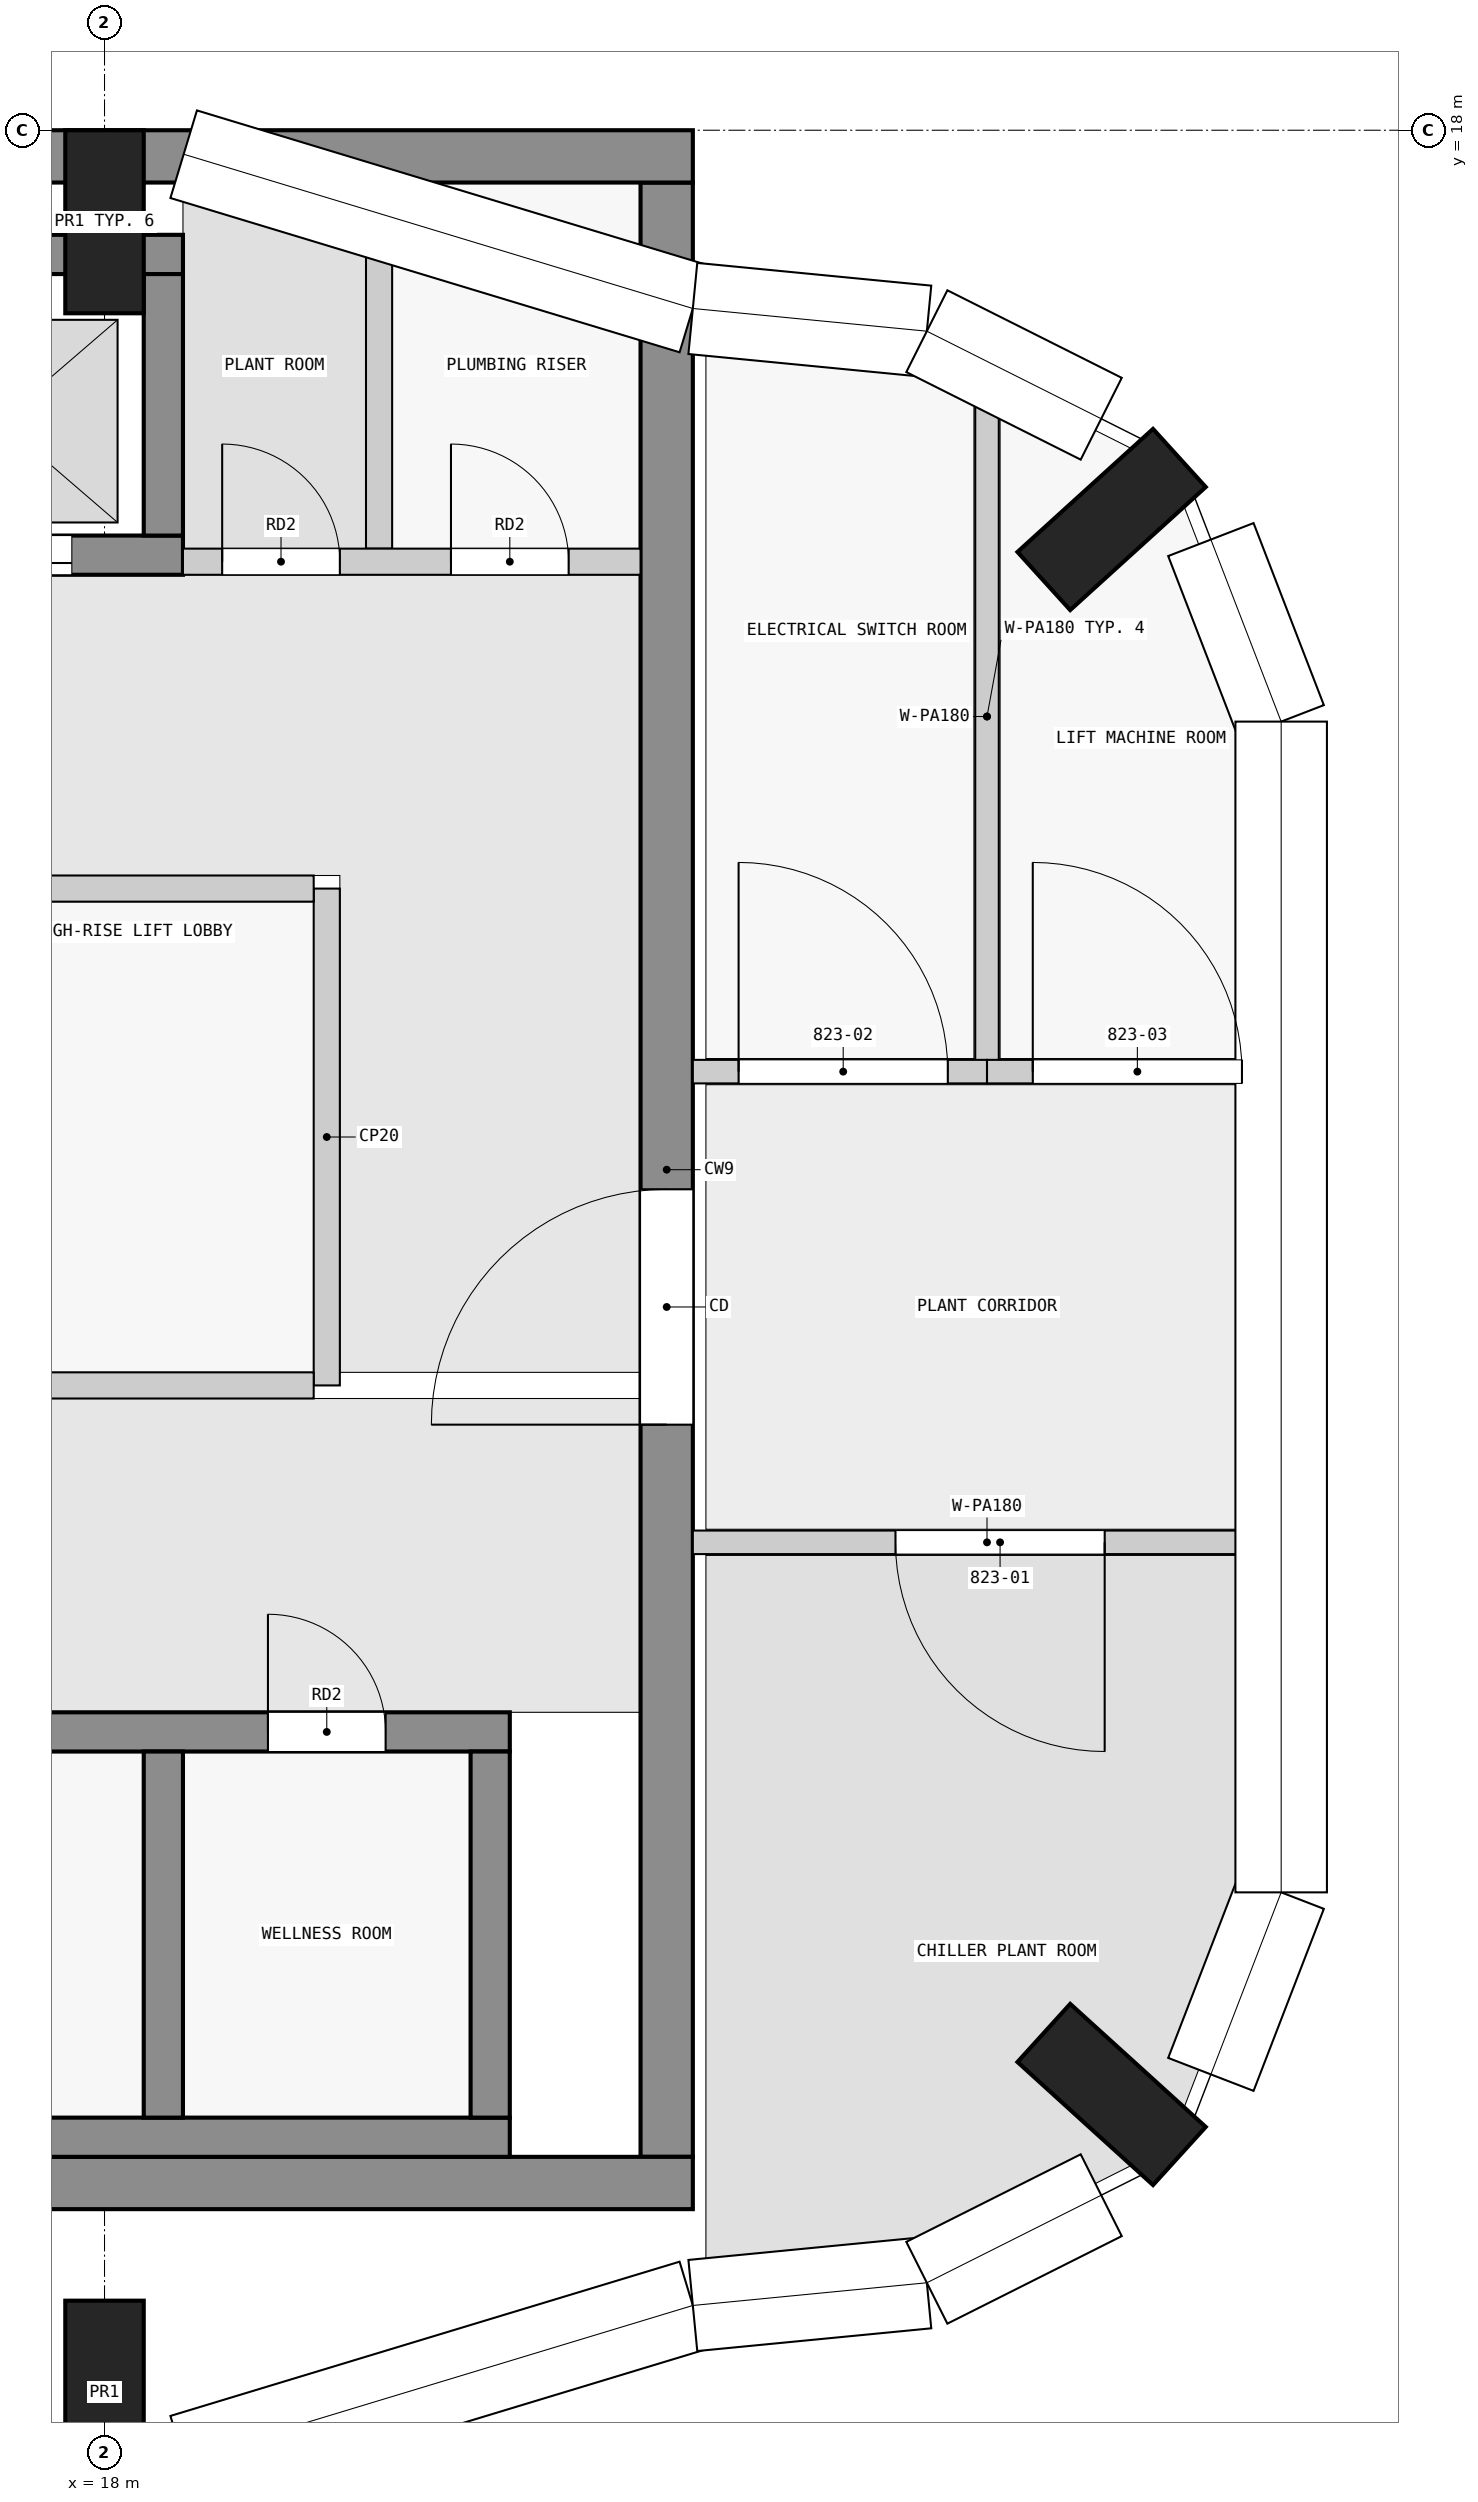
"""IFC4 building model, lengths in metres.
Left out: names, types, materials, properties, quantities, classifications, styles, units other than length and angle.
Written with IfcOpenShell. Run it as: python <this file> out.ifc"""

import sys

from ifc_helpers import new_model, si_unit, direction, frame, frame_2d, origin, origin_2d, place, context, subcontext, project, spatial, rectangle, extrude, element, fill, save


model = new_model("IFC4")
c1 = context("Model", 3, precision=1e-05, world=origin(), true_north=direction((0.0, 1.0)))
c2 = subcontext(c1, "Body", "Model", "MODEL_VIEW")
j1 = project(units=[si_unit("LENGTHUNIT", "METRE"), si_unit("PLANEANGLEUNIT", "RADIAN")], contexts=[c1])
p1 = place(None, origin())
s1 = spatial("IfcSite", under=j1, at=p1, CompositionType="ELEMENT")
p2 = place(p1, origin())
s2 = spatial("IfcBuilding", under=s1, at=p2, CompositionType="ELEMENT")
p3 = place(p2, frame((0.0, 0.0, 308.9)))
s3 = spatial("IfcBuildingStorey", under=s2, at=p3, CompositionType="ELEMENT", Elevation=308.9)
for number, where, z_axis, x_axis in (
    (1, (18.0, 0.7, 0.0), (0.0, 0.0, 1.0), (1.0, 0.0, 0.0)),
    (2, (25.703, 2.977, 0.0), (0.0, 0.0, 1.0), (0.672, 0.74, 0.0)),
    (3, (25.703, 15.023, 0.0), (0.0, 0.0, 1.0), (-0.672, 0.74, 0.0)),
    (4, (18.0, 17.3, 0.0), (0.0, 0.0, 1.0), (1.0, 0.0, 0.0)),
):
    element("IfcColumn", number, at=place(p3, frame(where, z_axis=z_axis, x_axis=x_axis)), inside=s3, PredefinedType="COLUMN", context=c2, shape_type="SweptSolid", body=[
        extrude(rectangle(XDim=0.6, YDim=1.4, at=origin_2d()), origin(), (0.0, 0.0, 1.0), 3.5),
    ])
for number, where, z_axis, x_axis in (
    (5, (1.9, 2.3, 0.0), (0.0, 0.0, 1.0), (1.0, 0.0, 0.0)),
    (6, (1.9, 17.8, 0.0), (0.0, 0.0, 1.0), (1.0, 0.0, 0.0)),
):
    element("IfcWall", number, at=place(p3, frame(where, z_axis=z_axis, x_axis=x_axis)), inside=s3, PredefinedType="SHEAR", context=c2, shape_type="SweptSolid", body=[
        extrude(rectangle(XDim=20.6, YDim=0.4, at=frame_2d((10.3, 0.0))), origin(), (0.0, 0.0, 1.0), 3.2),
    ])
p4 = place(p3, frame((22.3, 2.5, 0.0), z_axis=(0.0, 0.0, 1.0), x_axis=(0.0, 1.0, 0.0)))
e7 = element("IfcWall", 7, at=p4, inside=s3, PredefinedType="SHEAR", context=c2, shape_type="SweptSolid", body=[
    extrude(rectangle(XDim=15.1, YDim=0.4, at=frame_2d((7.55, 0.0))), origin(), (0.0, 0.0, 1.0), 3.2),
])
p5 = place(p4, frame((5.6, 0.0, 0.0)))
e8 = element("IfcOpeningElement", 8, at=p5, cuts=e7, PredefinedType="OPENING", context=c2, shape_type="SweptSolid", body=[
    extrude(rectangle(XDim=1.8, YDim=2.1, at=frame_2d((0.9, 1.05))), frame((0.0, 0.21, 0.0), z_axis=(0.0, -1.0, 0.0), x_axis=(1.0, 0.0, 0.0)), (0.0, 0.0, 1.0), 0.42),
])
p6 = place(p3, frame((13.3, 2.65, 0.0), z_axis=(0.0, 0.0, 1.0), x_axis=(1.0, 0.0, 0.0)))
e9 = element("IfcWall", 9, at=p6, inside=s3, PredefinedType="SHEAR", context=c2, shape_type="SweptSolid", body=[
    extrude(rectangle(XDim=7.8, YDim=0.3, at=frame_2d((3.9, 0.0))), origin(), (0.0, 0.0, 1.0), 3.2),
])
for number, where, z_axis, x_axis in (
    (10, (18.45, 2.8, 0.0), (0.0, 0.0, 1.0), (0.0, 1.0, 0.0)),
    (11, (20.95, 2.8, 0.0), (0.0, 0.0, 1.0), (0.0, 1.0, 0.0)),
):
    element("IfcWall", number, at=place(p3, frame(where, z_axis=z_axis, x_axis=x_axis)), inside=s3, PredefinedType="SHEAR", context=c2, shape_type="SweptSolid", body=[
        extrude(rectangle(XDim=2.8, YDim=0.3, at=frame_2d((1.4, 0.0))), origin(), (0.0, 0.0, 1.0), 3.2),
    ])
p7 = place(p3, frame((2.3, 5.75, 0.0), z_axis=(0.0, 0.0, 1.0), x_axis=(1.0, 0.0, 0.0)))
e12 = element("IfcWall", 12, at=p7, inside=s3, PredefinedType="SHEAR", context=c2, shape_type="SweptSolid", body=[
    extrude(rectangle(XDim=18.8, YDim=0.3, at=frame_2d((9.4, 0.0))), origin(), (0.0, 0.0, 1.0), 3.2),
])
p8 = place(p7, frame((4.65, 0.0, 0.0)))
e13 = element("IfcOpeningElement", 13, at=p8, cuts=e12, PredefinedType="OPENING", context=c2, shape_type="SweptSolid", body=[
    extrude(rectangle(XDim=1.1, YDim=2.1, at=frame_2d((0.55, 1.05))), frame((0.0, 0.16, 0.0), z_axis=(0.0, -1.0, 0.0), x_axis=(1.0, 0.0, 0.0)), (0.0, 0.0, 1.0), 0.32),
])
p9 = place(p7, frame((0.45, 0.0, 0.0)))
e14 = element("IfcOpeningElement", 14, at=p9, cuts=e12, PredefinedType="OPENING", context=c2, shape_type="SweptSolid", body=[
    extrude(rectangle(XDim=1.1, YDim=2.1, at=frame_2d((0.55, 1.05))), frame((0.0, 0.16, 0.0), z_axis=(0.0, -1.0, 0.0), x_axis=(1.0, 0.0, 0.0)), (0.0, 0.0, 1.0), 0.32),
])
p10 = place(p7, frame((2.75, 0.0, 0.0)))
e15 = element("IfcOpeningElement", 15, at=p10, cuts=e12, PredefinedType="OPENING", context=c2, shape_type="SweptSolid", body=[
    extrude(rectangle(XDim=1.1, YDim=2.1, at=frame_2d((0.55, 1.05))), frame((0.0, 0.16, 0.0), z_axis=(0.0, -1.0, 0.0), x_axis=(1.0, 0.0, 0.0)), (0.0, 0.0, 1.0), 0.32),
])
p11 = place(p7, frame((13.2, 0.0, 0.0)))
e16 = element("IfcOpeningElement", 16, at=p11, cuts=e12, PredefinedType="OPENING", context=c2, shape_type="SweptSolid", body=[
    extrude(rectangle(XDim=0.9, YDim=2.1, at=frame_2d((0.45, 1.05))), frame((0.0, 0.16, 0.0), z_axis=(0.0, -1.0, 0.0), x_axis=(1.0, 0.0, 0.0)), (0.0, 0.0, 1.0), 0.32),
])
p12 = place(p7, frame((16.95, 0.0, 0.0)))
e17 = element("IfcOpeningElement", 17, at=p12, cuts=e12, PredefinedType="OPENING", context=c2, shape_type="SweptSolid", body=[
    extrude(rectangle(XDim=0.9, YDim=2.1, at=frame_2d((0.45, 1.05))), frame((0.0, 0.16, 0.0), z_axis=(0.0, -1.0, 0.0), x_axis=(1.0, 0.0, 0.0)), (0.0, 0.0, 1.0), 0.32),
])
p13 = place(p3, frame((10.8, 17.05, 0.0), z_axis=(0.0, 0.0, 1.0), x_axis=(1.0, 0.0, 0.0)))
e18 = element("IfcWall", 18, at=p13, inside=s3, PredefinedType="SHEAR", context=c2, shape_type="SweptSolid", body=[
    extrude(rectangle(XDim=7.8, YDim=0.3, at=frame_2d((3.9, 0.0))), origin(), (0.0, 0.0, 1.0), 3.2),
])
p14 = place(p3, frame((10.8, 14.75, 0.0), z_axis=(0.0, 0.0, 1.0), x_axis=(1.0, 0.0, 0.0)))
e19 = element("IfcWall", 19, at=p14, inside=s3, PredefinedType="SHEAR", context=c2, shape_type="SweptSolid", body=[
    extrude(rectangle(XDim=7.8, YDim=0.3, at=frame_2d((3.9, 0.0))), origin(), (0.0, 0.0, 1.0), 3.2),
])
p15 = place(p14, frame((0.85, 0.0, 0.0)))
e20 = element("IfcOpeningElement", 20, at=p15, cuts=e19, PredefinedType="OPENING", context=c2, shape_type="SweptSolid", body=[
    extrude(rectangle(XDim=1.1, YDim=2.1, at=frame_2d((0.55, 1.05))), frame((0.0, 0.16, 0.0), z_axis=(0.0, -1.0, 0.0), x_axis=(1.0, 0.0, 0.0)), (0.0, 0.0, 1.0), 0.32),
])
p16 = place(p14, frame((3.35, 0.0, 0.0)))
e21 = element("IfcOpeningElement", 21, at=p16, cuts=e19, PredefinedType="OPENING", context=c2, shape_type="SweptSolid", body=[
    extrude(rectangle(XDim=1.1, YDim=2.1, at=frame_2d((0.55, 1.05))), frame((0.0, 0.16, 0.0), z_axis=(0.0, -1.0, 0.0), x_axis=(1.0, 0.0, 0.0)), (0.0, 0.0, 1.0), 0.32),
])
p17 = place(p14, frame((5.85, 0.0, 0.0)))
e22 = element("IfcOpeningElement", 22, at=p17, cuts=e19, PredefinedType="OPENING", context=c2, shape_type="SweptSolid", body=[
    extrude(rectangle(XDim=1.1, YDim=2.1, at=frame_2d((0.55, 1.05))), frame((0.0, 0.16, 0.0), z_axis=(0.0, -1.0, 0.0), x_axis=(1.0, 0.0, 0.0)), (0.0, 0.0, 1.0), 0.32),
])
p18 = place(p3, frame((18.45, 14.9, 0.0), z_axis=(0.0, 0.0, 1.0), x_axis=(0.0, 1.0, 0.0)))
e23 = element("IfcWall", 23, at=p18, inside=s3, PredefinedType="SHEAR", context=c2, shape_type="SweptSolid", body=[
    extrude(rectangle(XDim=2.0, YDim=0.3, at=frame_2d((1.0, 0.0))), origin(), (0.0, 0.0, 1.0), 3.2),
])
p19 = place(p3, frame((10.9, 8.4, 0.0), z_axis=(0.0, 0.0, 1.0), x_axis=(1.0, 0.0, 0.0)))
e24 = element("IfcWall", 24, at=p19, inside=s3, PredefinedType="PARTITIONING", context=c2, shape_type="SweptSolid", body=[
    extrude(rectangle(XDim=8.7, YDim=0.2, at=frame_2d((4.35, 0.0))), origin(), (0.0, 0.0, 1.0), 3.2),
])
p20 = place(p3, frame((19.7, 8.4, 0.0), z_axis=(0.0, 0.0, 1.0), x_axis=(0.0, 1.0, 0.0)))
e25 = element("IfcWall", 25, at=p20, inside=s3, PredefinedType="PARTITIONING", context=c2, shape_type="SweptSolid", body=[
    extrude(rectangle(XDim=3.8, YDim=0.2, at=frame_2d((1.9, 0.0))), origin(), (0.0, 0.0, 1.0), 3.2),
])
p21 = place(p3, frame((10.9, 12.2, 0.0), z_axis=(0.0, 0.0, 1.0), x_axis=(1.0, 0.0, 0.0)))
e26 = element("IfcWall", 26, at=p21, inside=s3, PredefinedType="PARTITIONING", context=c2, shape_type="SweptSolid", body=[
    extrude(rectangle(XDim=8.7, YDim=0.2, at=frame_2d((4.35, 0.0))), origin(), (0.0, 0.0, 1.0), 3.2),
])
p22 = place(p21, frame((3.9, 0.0, 0.0)))
e27 = element("IfcOpeningElement", 27, at=p22, cuts=e26, PredefinedType="OPENING", context=c2, shape_type="SweptSolid", body=[
    extrude(rectangle(XDim=0.9, YDim=2.1, at=frame_2d((0.45, 1.05))), frame((0.0, 0.11, 0.0), z_axis=(0.0, -1.0, 0.0), x_axis=(1.0, 0.0, 0.0)), (0.0, 0.0, 1.0), 0.22),
])
p23 = place(p3, frame((18.6, 14.7, 0.0), z_axis=(0.0, 0.0, 1.0), x_axis=(1.0, 0.0, 0.0)))
e28 = element("IfcWall", 28, at=p23, inside=s3, PredefinedType="PARTITIONING", context=c2, shape_type="SweptSolid", body=[
    extrude(rectangle(XDim=3.5, YDim=0.2, at=frame_2d((1.75, 0.0))), origin(), (0.0, 0.0, 1.0), 3.2),
])
p24 = place(p23, frame((0.3, 0.0, 0.0)))
e29 = element("IfcOpeningElement", 29, at=p24, cuts=e28, PredefinedType="OPENING", context=c2, shape_type="SweptSolid", body=[
    extrude(rectangle(XDim=0.9, YDim=2.1, at=frame_2d((0.45, 1.05))), frame((0.0, 0.11, 0.0), z_axis=(0.0, -1.0, 0.0), x_axis=(1.0, 0.0, 0.0)), (0.0, 0.0, 1.0), 0.22),
])
p25 = place(p23, frame((2.05, 0.0, 0.0)))
e30 = element("IfcOpeningElement", 30, at=p25, cuts=e28, PredefinedType="OPENING", context=c2, shape_type="SweptSolid", body=[
    extrude(rectangle(XDim=0.9, YDim=2.1, at=frame_2d((0.45, 1.05))), frame((0.0, 0.11, 0.0), z_axis=(0.0, -1.0, 0.0), x_axis=(1.0, 0.0, 0.0)), (0.0, 0.0, 1.0), 0.22),
])
p26 = place(p3, frame((20.1, 14.8, 0.0), z_axis=(0.0, 0.0, 1.0), x_axis=(0.0, 1.0, 0.0)))
e31 = element("IfcWall", 31, at=p26, inside=s3, PredefinedType="PARTITIONING", context=c2, shape_type="SweptSolid", body=[
    extrude(rectangle(XDim=2.8, YDim=0.2, at=frame_2d((1.4, 0.0))), origin(), (0.0, 0.0, 1.0), 3.2),
])
p27 = place(p3, frame((24.75, 16.232, 0.0), z_axis=(0.0, 0.0, 1.0), x_axis=(0.0, -1.0, 0.0)))
e32 = element("IfcWall", 32, at=p27, inside=s3, PredefinedType="PARTITIONING", context=c2, shape_type="SweptSolid", body=[
    extrude(rectangle(XDim=5.432, YDim=0.18, at=frame_2d((2.716, 0.0))), origin(), (0.0, 0.0, 1.0), 2.747),
])
p28 = place(p3, frame((27.0, 7.2, 0.0), z_axis=(0.0, 0.0, 1.0), x_axis=(-1.0, 0.0, 0.0)))
e33 = element("IfcWall", 33, at=p28, inside=s3, PredefinedType="PARTITIONING", context=c2, shape_type="SweptSolid", body=[
    extrude(rectangle(XDim=4.5, YDim=0.18, at=frame_2d((2.25, 0.0))), origin(), (0.0, 0.0, 1.0), 2.592),
])
p29 = place(p28, frame((1.35, 0.0, 0.0)))
e34 = element("IfcOpeningElement", 34, at=p29, cuts=e33, PredefinedType="OPENING", context=c2, shape_type="SweptSolid", body=[
    extrude(rectangle(XDim=1.6, YDim=2.4, at=frame_2d((0.8, 1.2))), frame((0.0, 0.1, 0.0), z_axis=(0.0, -1.0, 0.0), x_axis=(1.0, 0.0, 0.0)), (0.0, 0.0, 1.0), 0.2),
])
p30 = place(p3, frame((22.5, 10.8, 0.0), z_axis=(0.0, 0.0, 1.0), x_axis=(1.0, 0.0, 0.0)))
e35 = element("IfcWall", 35, at=p30, inside=s3, PredefinedType="PARTITIONING", context=c2, shape_type="SweptSolid", body=[
    extrude(rectangle(XDim=2.25, YDim=0.18, at=frame_2d((1.125, 0.0))), origin(), (0.0, 0.0, 1.0), 3.2),
])
p31 = place(p30, frame((0.35, 0.0, 0.0)))
e36 = element("IfcOpeningElement", 36, at=p31, cuts=e35, PredefinedType="OPENING", context=c2, shape_type="SweptSolid", body=[
    extrude(rectangle(XDim=1.6, YDim=2.4, at=frame_2d((0.8, 1.2))), frame((0.0, 0.1, 0.0), z_axis=(0.0, -1.0, 0.0), x_axis=(1.0, 0.0, 0.0)), (0.0, 0.0, 1.0), 0.2),
])
p32 = place(p3, frame((24.75, 10.8, 0.0), z_axis=(0.0, 0.0, 1.0), x_axis=(1.0, 0.0, 0.0)))
e37 = element("IfcWall", 37, at=p32, inside=s3, PredefinedType="PARTITIONING", context=c2, shape_type="SweptSolid", body=[
    extrude(rectangle(XDim=2.25, YDim=0.18, at=frame_2d((1.125, 0.0))), origin(), (0.0, 0.0, 1.0), 2.592),
])
p33 = place(p32, frame((0.35, 0.0, 0.0)))
e38 = element("IfcOpeningElement", 38, at=p33, cuts=e37, PredefinedType="OPENING", context=c2, shape_type="SweptSolid", body=[
    extrude(rectangle(XDim=1.6, YDim=2.4, at=frame_2d((0.8, 1.2))), frame((0.0, 0.1, 0.0), z_axis=(0.0, -1.0, 0.0), x_axis=(1.0, 0.0, 0.0)), (0.0, 0.0, 1.0), 0.2),
])
p34 = place(p17, origin())
e39 = element("IfcDoor", 39, at=p34, inside=s3, OperationType="DOUBLE_DOOR_SLIDING", PredefinedType="DOOR", context=c2, shape_type="SweptSolid", body=[
    extrude(rectangle(XDim=1.1, YDim=2.1, at=frame_2d((0.55, 1.05))), frame((0.0, 0.025, 0.0), z_axis=(0.0, -1.0, 0.0), x_axis=(1.0, 0.0, 0.0)), (0.0, 0.0, 1.0), 0.05),
])
fill(e22, e39)
p35 = place(p5, origin())
e40 = element("IfcDoor", 40, at=p35, inside=s3, OperationType="DOUBLE_DOOR_SINGLE_SWING", PredefinedType="DOOR", context=c2, shape_type="SweptSolid", body=[
    extrude(rectangle(XDim=1.8, YDim=2.1, at=frame_2d((0.9, 1.05))), frame((0.0, 0.025, 0.0), z_axis=(0.0, -1.0, 0.0), x_axis=(1.0, 0.0, 0.0)), (0.0, 0.0, 1.0), 0.05),
])
fill(e8, e40)
p36 = place(p24, origin())
e41 = element("IfcDoor", 41, at=p36, inside=s3, OperationType="SINGLE_SWING_LEFT", PredefinedType="DOOR", context=c2, shape_type="SweptSolid", body=[
    extrude(rectangle(XDim=0.9, YDim=2.1, at=frame_2d((0.45, 1.05))), frame((0.0, 0.025, 0.0), z_axis=(0.0, -1.0, 0.0), x_axis=(1.0, 0.0, 0.0)), (0.0, 0.0, 1.0), 0.05),
])
fill(e29, e41)
p37 = place(p25, origin())
e42 = element("IfcDoor", 42, at=p37, inside=s3, OperationType="SINGLE_SWING_LEFT", PredefinedType="DOOR", context=c2, shape_type="SweptSolid", body=[
    extrude(rectangle(XDim=0.9, YDim=2.1, at=frame_2d((0.45, 1.05))), frame((0.0, 0.025, 0.0), z_axis=(0.0, -1.0, 0.0), x_axis=(1.0, 0.0, 0.0)), (0.0, 0.0, 1.0), 0.05),
])
fill(e30, e42)
p38 = place(p12, origin())
e43 = element("IfcDoor", 43, at=p38, inside=s3, OperationType="SINGLE_SWING_LEFT", PredefinedType="DOOR", context=c2, shape_type="SweptSolid", body=[
    extrude(rectangle(XDim=0.9, YDim=2.1, at=frame_2d((0.45, 1.05))), frame((0.0, 0.025, 0.0), z_axis=(0.0, -1.0, 0.0), x_axis=(1.0, 0.0, 0.0)), (0.0, 0.0, 1.0), 0.05),
])
fill(e17, e43)
p39 = place(p29, origin())
e44 = element("IfcDoor", 44, at=p39, inside=s3, OperationType="SINGLE_SWING_LEFT", PredefinedType="DOOR", context=c2, shape_type="SweptSolid", body=[
    extrude(rectangle(XDim=1.6, YDim=2.4, at=frame_2d((0.8, 1.2))), frame((0.0, 0.025, 0.0), z_axis=(0.0, -1.0, 0.0), x_axis=(1.0, 0.0, 0.0)), (0.0, 0.0, 1.0), 0.05),
])
fill(e34, e44)
p40 = place(p31, origin())
e45 = element("IfcDoor", 45, at=p40, inside=s3, OperationType="SINGLE_SWING_LEFT", PredefinedType="DOOR", context=c2, shape_type="SweptSolid", body=[
    extrude(rectangle(XDim=1.6, YDim=2.4, at=frame_2d((0.8, 1.2))), frame((0.0, 0.025, 0.0), z_axis=(0.0, -1.0, 0.0), x_axis=(1.0, 0.0, 0.0)), (0.0, 0.0, 1.0), 0.05),
])
fill(e36, e45)
p41 = place(p33, origin())
e46 = element("IfcDoor", 46, at=p41, inside=s3, OperationType="SINGLE_SWING_LEFT", PredefinedType="DOOR", context=c2, shape_type="SweptSolid", body=[
    extrude(rectangle(XDim=1.6, YDim=2.4, at=frame_2d((0.8, 1.2))), frame((0.0, 0.025, 0.0), z_axis=(0.0, -1.0, 0.0), x_axis=(1.0, 0.0, 0.0)), (0.0, 0.0, 1.0), 0.05),
])
fill(e38, e46)
save(model, sys.argv[1])
